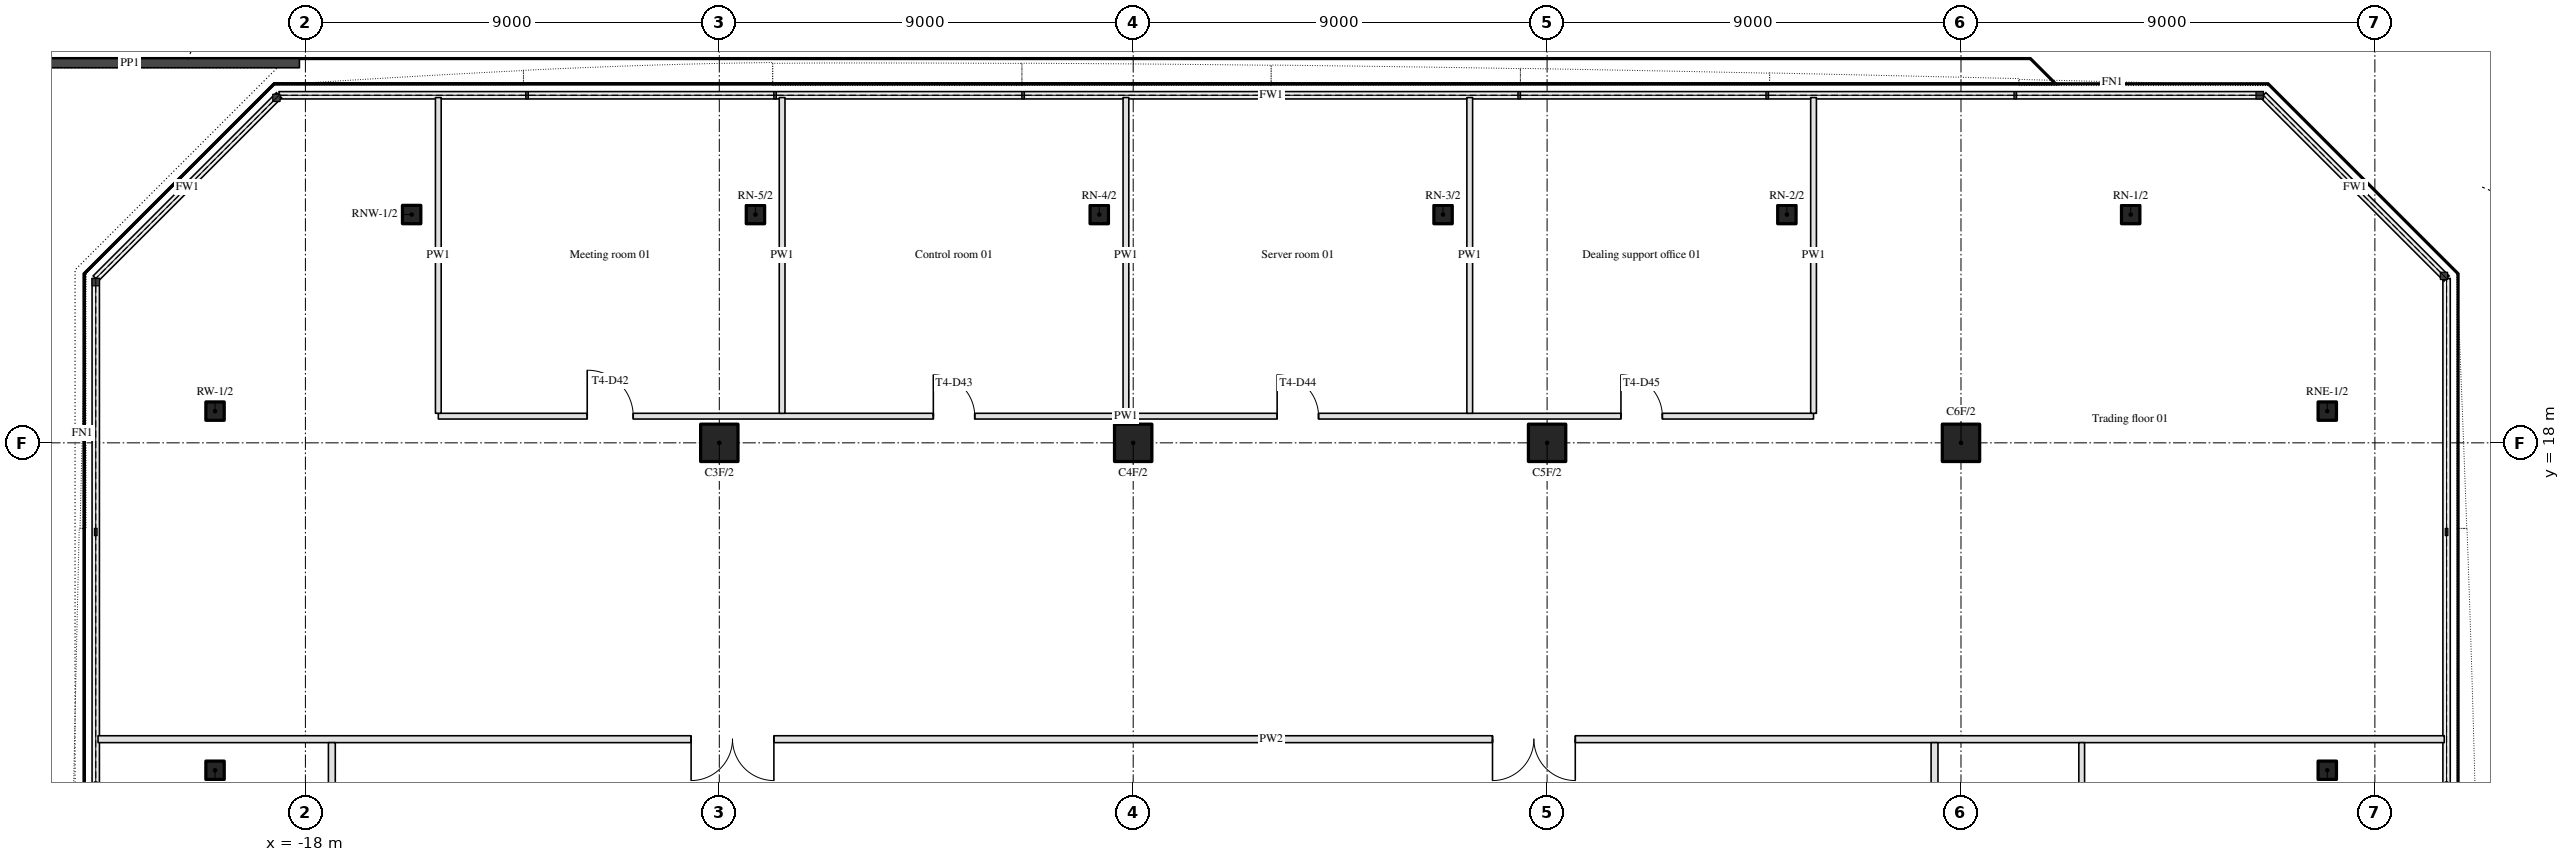
"""IFC4 building model, lengths in metres.
Left out: names, types, materials, properties, quantities, classifications, styles, units other than length and angle.
Written with IfcOpenShell. Run it as: python <this file> out.ifc"""

import sys

from ifc_helpers import new_model, si_unit, direction, frame, frame_2d, origin, origin_2d, place, context, subcontext, project, spatial, rectangle, hollow_rectangle, hollow_circle, extrude, element, fill, save


model = new_model("IFC4")
c1 = context("Model", 3, precision=1e-05, world=origin(), true_north=direction((0.0, 1.0)))
c2 = subcontext(c1, "Body", "Model", "MODEL_VIEW")
j1 = project(units=[si_unit("LENGTHUNIT", "METRE"), si_unit("PLANEANGLEUNIT", "RADIAN")], contexts=[c1])
p1 = place(None, origin())
s1 = spatial("IfcSite", under=j1, at=p1, CompositionType="ELEMENT")
p2 = place(p1, origin())
s2 = spatial("IfcBuilding", under=s1, at=p2, CompositionType="ELEMENT")
p3 = place(p2, frame((0.0, 0.0, 62.1)))
s3 = spatial("IfcBuildingStorey", under=s2, at=p3, CompositionType="ELEMENT", Elevation=62.1)
for number, where, z_axis, x_axis in (
    (1, (-9.0, 18.0, 0.0), (0.0, 0.0, 1.0), (1.0, 0.0, 0.0)),
    (2, (0.0, 18.0, 0.0), (0.0, 0.0, 1.0), (1.0, 0.0, 0.0)),
    (3, (9.0, 18.0, 0.0), (0.0, 0.0, 1.0), (1.0, 0.0, 0.0)),
    (4, (18.0, 18.0, 0.0), (0.0, 0.0, 1.0), (1.0, 0.0, 0.0)),
):
    element("IfcColumn", number, at=place(p3, frame(where, z_axis=z_axis, x_axis=x_axis)), inside=s3, PredefinedType="COLUMN", context=c2, shape_type="SweptSolid", body=[
        extrude(hollow_circle(Radius=0.406, WallThickness=0.036, at=origin_2d()), origin(), (0.0, 0.0, 1.0), 3.9),
    ])
for number, where, z_axis, x_axis in (
    (5, (25.965, 10.879, 0.0), (0.0, 0.0, 1.0), (1.0, 0.0, 0.0)),
    (6, (25.965, 18.69, 0.0), (0.0, 0.0, 1.0), (1.0, 0.0, 0.0)),
    (7, (21.69, 22.965, 0.0), (0.0, 0.0, 1.0), (1.0, 0.0, 0.0)),
    (8, (14.214, 22.965, 0.0), (0.0, 0.0, 1.0), (1.0, 0.0, 0.0)),
    (9, (6.738, 22.965, 0.0), (0.0, 0.0, 1.0), (1.0, 0.0, 0.0)),
    (10, (-0.738, 22.965, 0.0), (0.0, 0.0, 1.0), (1.0, 0.0, 0.0)),
    (11, (-8.214, 22.965, 0.0), (0.0, 0.0, 1.0), (1.0, 0.0, 0.0)),
    (12, (-15.69, 22.965, 0.0), (0.0, 0.0, 1.0), (1.0, 0.0, 0.0)),
    (13, (-19.965, 18.69, 0.0), (0.0, 0.0, 1.0), (1.0, 0.0, 0.0)),
    (14, (-19.965, 10.879, 0.0), (0.0, 0.0, 1.0), (1.0, 0.0, 0.0)),
):
    element("IfcColumn", number, at=place(p3, frame(where, z_axis=z_axis, x_axis=x_axis)), inside=s3, PredefinedType="COLUMN", context=c2, shape_type="SweptSolid", body=[
        extrude(hollow_rectangle(XDim=0.4, YDim=0.4, WallThickness=0.025, InnerFilletRadius=0.038, OuterFilletRadius=0.062, at=origin_2d()), origin(), (0.0, 0.0, 1.0), 3.9),
    ])
p4 = place(p3, frame((-18.13, 26.257, 0.0), z_axis=(0.0, 0.0, 1.0), x_axis=(-1.0, 0.0, 0.0)))
e15 = element("IfcWall", 15, at=p4, inside=s3, PredefinedType="PARAPET", context=c2, shape_type="SweptSolid", body=[
    extrude(rectangle(XDim=7.379, YDim=0.2, at=frame_2d((3.689, 0.0))), origin(), (0.0, 0.0, 1.0), 1.0),
])
p5 = place(p3, frame((28.509, 11.555, 0.0), z_axis=(0.0, 0.0, 1.0), x_axis=(-1.0, 0.0, 0.0)))
e16 = element("IfcWall", 16, at=p5, inside=s3, PredefinedType="PARTITIONING", context=c2, shape_type="SweptSolid", body=[
    extrude(rectangle(XDim=51.018, YDim=0.15, at=frame_2d((25.509, 0.0))), origin(), (0.0, 0.0, 1.0), 2.96),
])
p6 = place(p5, frame((36.322, 0.0, 0.0)))
e17 = element("IfcOpeningElement", 17, at=p6, cuts=e16, PredefinedType="OPENING", context=c2, shape_type="SweptSolid", body=[
    extrude(rectangle(XDim=1.8, YDim=2.1, at=frame_2d((0.9, 1.05))), frame((0.0, 0.085, 0.0), z_axis=(0.0, -1.0, 0.0), x_axis=(1.0, 0.0, 0.0)), (0.0, 0.0, 1.0), 0.17),
])
p7 = place(p5, frame((18.896, 0.0, 0.0)))
e18 = element("IfcOpeningElement", 18, at=p7, cuts=e16, PredefinedType="OPENING", context=c2, shape_type="SweptSolid", body=[
    extrude(rectangle(XDim=1.8, YDim=2.1, at=frame_2d((0.9, 1.05))), frame((0.0, 0.085, 0.0), z_axis=(0.0, -1.0, 0.0), x_axis=(1.0, 0.0, 0.0)), (0.0, 0.0, 1.0), 0.17),
])
p8 = place(p3, frame((-15.11, 18.58, 0.0), z_axis=(0.0, 0.0, 1.0), x_axis=(1.0, 0.0, 0.0)))
e19 = element("IfcWall", 19, at=p8, inside=s3, PredefinedType="PARTITIONING", context=c2, shape_type="SweptSolid", body=[
    extrude(rectangle(XDim=29.904, YDim=0.125, at=frame_2d((14.952, 0.0))), origin(), (0.0, 0.0, 1.0), 2.96),
])
p9 = place(p8, frame((10.764, 0.0, 0.0)))
e20 = element("IfcOpeningElement", 20, at=p9, cuts=e19, PredefinedType="OPENING", context=c2, shape_type="SweptSolid", body=[
    extrude(rectangle(XDim=0.9, YDim=2.1, at=frame_2d((0.45, 1.05))), frame((0.0, 0.073, 0.0), z_axis=(0.0, -1.0, 0.0), x_axis=(1.0, 0.0, 0.0)), (0.0, 0.0, 1.0), 0.145),
])
p10 = place(p8, frame((3.238, 0.0, 0.0)))
e21 = element("IfcOpeningElement", 21, at=p10, cuts=e19, PredefinedType="OPENING", context=c2, shape_type="SweptSolid", body=[
    extrude(rectangle(XDim=1.0, YDim=2.1, at=frame_2d((0.5, 1.05))), frame((0.0, 0.073, 0.0), z_axis=(0.0, -1.0, 0.0), x_axis=(1.0, 0.0, 0.0)), (0.0, 0.0, 1.0), 0.145),
])
p11 = place(p8, frame((25.716, 0.0, 0.0)))
e22 = element("IfcOpeningElement", 22, at=p11, cuts=e19, PredefinedType="OPENING", context=c2, shape_type="SweptSolid", body=[
    extrude(rectangle(XDim=0.9, YDim=2.1, at=frame_2d((0.45, 1.05))), frame((0.0, 0.073, 0.0), z_axis=(0.0, -1.0, 0.0), x_axis=(1.0, 0.0, 0.0)), (0.0, 0.0, 1.0), 0.145),
])
p12 = place(p8, frame((18.24, 0.0, 0.0)))
e23 = element("IfcOpeningElement", 23, at=p12, cuts=e19, PredefinedType="OPENING", context=c2, shape_type="SweptSolid", body=[
    extrude(rectangle(XDim=0.9, YDim=2.1, at=frame_2d((0.45, 1.05))), frame((0.0, 0.073, 0.0), z_axis=(0.0, -1.0, 0.0), x_axis=(1.0, 0.0, 0.0)), (0.0, 0.0, 1.0), 0.145),
])
p13 = place(p3, frame((-17.425, -14.925, 0.0), z_axis=(0.0, 0.0, 1.0), x_axis=(0.0, 1.0, 0.0)))
e24 = element("IfcWall", 24, at=p13, inside=s3, PredefinedType="PARTITIONING", context=c2, shape_type="SweptSolid", body=[
    extrude(rectangle(XDim=26.405, YDim=0.15, at=frame_2d((13.203, 0.0))), origin(), (0.0, 0.0, 1.0), 2.96),
])
p14 = place(p13, frame((0.762, 0.0, 0.0)))
e25 = element("IfcOpeningElement", 25, at=p14, cuts=e24, PredefinedType="OPENING", context=c2, shape_type="SweptSolid", body=[
    extrude(rectangle(XDim=0.9, YDim=2.1, at=frame_2d((0.45, 1.05))), frame((0.0, 0.085, 0.0), z_axis=(0.0, -1.0, 0.0), x_axis=(1.0, 0.0, 0.0)), (0.0, 0.0, 1.0), 0.17),
])
p15 = place(p13, frame((6.357, 0.0, 0.0)))
e26 = element("IfcOpeningElement", 26, at=p15, cuts=e24, PredefinedType="OPENING", context=c2, shape_type="SweptSolid", body=[
    extrude(rectangle(XDim=1.0, YDim=2.1, at=frame_2d((0.5, 1.05))), frame((0.0, 0.085, 0.0), z_axis=(0.0, -1.0, 0.0), x_axis=(1.0, 0.0, 0.0)), (0.0, 0.0, 1.0), 0.17),
])
p16 = place(p13, frame((14.168, 0.0, 0.0)))
e27 = element("IfcOpeningElement", 27, at=p16, cuts=e24, PredefinedType="OPENING", context=c2, shape_type="SweptSolid", body=[
    extrude(rectangle(XDim=1.0, YDim=2.1, at=frame_2d((0.5, 1.05))), frame((0.0, 0.085, 0.0), z_axis=(0.0, -1.0, 0.0), x_axis=(1.0, 0.0, 0.0)), (0.0, 0.0, 1.0), 0.17),
])
p17 = place(p13, frame((21.052, 0.0, 0.0)))
e28 = element("IfcOpeningElement", 28, at=p17, cuts=e24, PredefinedType="OPENING", context=c2, shape_type="SweptSolid", body=[
    extrude(rectangle(XDim=1.0, YDim=2.1, at=frame_2d((0.5, 1.05))), frame((0.0, 0.085, 0.0), z_axis=(0.0, -1.0, 0.0), x_axis=(1.0, 0.0, 0.0)), (0.0, 0.0, 1.0), 0.17),
])
for number, where, z_axis, x_axis in (
    (29, (-15.11, 18.643, 0.0), (0.0, 0.0, 1.0), (0.0, 1.0, 0.0)),
    (30, (-7.634, 18.643, 0.0), (0.0, 0.0, 1.0), (0.0, 1.0, 0.0)),
    (31, (-0.158, 18.643, 0.0), (0.0, 0.0, 1.0), (0.0, 1.0, 0.0)),
    (32, (7.318, 18.643, 0.0), (0.0, 0.0, 1.0), (0.0, 1.0, 0.0)),
    (33, (14.794, 18.643, 0.0), (0.0, 0.0, 1.0), (0.0, 1.0, 0.0)),
):
    element("IfcWall", number, at=place(p3, frame(where, z_axis=z_axis, x_axis=x_axis)), inside=s3, PredefinedType="PARTITIONING", context=c2, shape_type="SweptSolid", body=[
        extrude(rectangle(XDim=6.866, YDim=0.125, at=frame_2d((3.433, 0.0))), origin(), (0.0, 0.0, 1.0), 2.96),
    ])
p18 = place(p3, frame((17.425, -14.925, 0.0), z_axis=(0.0, 0.0, 1.0), x_axis=(0.0, 1.0, 0.0)))
e34 = element("IfcWall", 34, at=p18, inside=s3, PredefinedType="PARTITIONING", context=c2, shape_type="SweptSolid", body=[
    extrude(rectangle(XDim=26.405, YDim=0.15, at=frame_2d((13.203, 0.0))), origin(), (0.0, 0.0, 1.0), 2.96),
])
p19 = place(p18, frame((0.312, 0.0, 0.0)))
e35 = element("IfcOpeningElement", 35, at=p19, cuts=e34, PredefinedType="OPENING", context=c2, shape_type="SweptSolid", body=[
    extrude(rectangle(XDim=1.8, YDim=2.1, at=frame_2d((0.9, 1.05))), frame((0.0, 0.085, 0.0), z_axis=(0.0, -1.0, 0.0), x_axis=(1.0, 0.0, 0.0)), (0.0, 0.0, 1.0), 0.17),
])
p20 = place(p18, frame((12.592, 0.0, 0.0)))
e36 = element("IfcOpeningElement", 36, at=p20, cuts=e34, PredefinedType="OPENING", context=c2, shape_type="SweptSolid", body=[
    extrude(rectangle(XDim=1.8, YDim=2.1, at=frame_2d((0.9, 1.05))), frame((0.0, 0.085, 0.0), z_axis=(0.0, -1.0, 0.0), x_axis=(1.0, 0.0, 0.0)), (0.0, 0.0, 1.0), 0.17),
])
p21 = place(p18, frame((21.551, 0.0, 0.0)))
e37 = element("IfcOpeningElement", 37, at=p21, cuts=e34, PredefinedType="OPENING", context=c2, shape_type="SweptSolid", body=[
    extrude(rectangle(XDim=1.8, YDim=2.1, at=frame_2d((0.9, 1.05))), frame((0.0, 0.085, 0.0), z_axis=(0.0, -1.0, 0.0), x_axis=(1.0, 0.0, 0.0)), (0.0, 0.0, 1.0), 0.17),
])
p22 = place(p3, frame((20.625, 3.71, 0.0), z_axis=(0.0, 0.0, 1.0), x_axis=(0.0, 1.0, 0.0)))
e38 = element("IfcWall", 38, at=p22, inside=s3, PredefinedType="PARTITIONING", context=c2, shape_type="SweptSolid", body=[
    extrude(rectangle(XDim=7.77, YDim=0.125, at=frame_2d((3.885, 0.0))), origin(), (0.0, 0.0, 1.0), 2.96),
])
p23 = place(p6, origin())
e39 = element("IfcDoor", 39, at=p23, inside=s3, OperationType="DOUBLE_DOOR_SINGLE_SWING", PredefinedType="DOOR", context=c2, shape_type="SweptSolid", body=[
    extrude(rectangle(XDim=1.8, YDim=2.1, at=frame_2d((0.9, 1.05))), frame((0.0, 0.025, 0.0), z_axis=(0.0, -1.0, 0.0), x_axis=(1.0, 0.0, 0.0)), (0.0, 0.0, 1.0), 0.05),
])
fill(e17, e39)
p24 = place(p7, origin())
e40 = element("IfcDoor", 40, at=p24, inside=s3, OperationType="DOUBLE_DOOR_SINGLE_SWING", PredefinedType="DOOR", context=c2, shape_type="SweptSolid", body=[
    extrude(rectangle(XDim=1.8, YDim=2.1, at=frame_2d((0.9, 1.05))), frame((0.0, 0.025, 0.0), z_axis=(0.0, -1.0, 0.0), x_axis=(1.0, 0.0, 0.0)), (0.0, 0.0, 1.0), 0.05),
])
fill(e18, e40)
p25 = place(p9, origin())
e41 = element("IfcDoor", 41, at=p25, inside=s3, OperationType="SINGLE_SWING_LEFT", PredefinedType="DOOR", context=c2, shape_type="SweptSolid", body=[
    extrude(rectangle(XDim=0.9, YDim=2.1, at=frame_2d((0.45, 1.05))), frame((0.0, 0.025, 0.0), z_axis=(0.0, -1.0, 0.0), x_axis=(1.0, 0.0, 0.0)), (0.0, 0.0, 1.0), 0.05),
])
fill(e20, e41)
p26 = place(p10, origin())
e42 = element("IfcDoor", 42, at=p26, inside=s3, OperationType="SINGLE_SWING_LEFT", PredefinedType="DOOR", context=c2, shape_type="SweptSolid", body=[
    extrude(rectangle(XDim=1.0, YDim=2.1, at=frame_2d((0.5, 1.05))), frame((0.0, 0.025, 0.0), z_axis=(0.0, -1.0, 0.0), x_axis=(1.0, 0.0, 0.0)), (0.0, 0.0, 1.0), 0.05),
])
fill(e21, e42)
p27 = place(p11, origin())
e43 = element("IfcDoor", 43, at=p27, inside=s3, OperationType="SINGLE_SWING_LEFT", PredefinedType="DOOR", context=c2, shape_type="SweptSolid", body=[
    extrude(rectangle(XDim=0.9, YDim=2.1, at=frame_2d((0.45, 1.05))), frame((0.0, 0.025, 0.0), z_axis=(0.0, -1.0, 0.0), x_axis=(1.0, 0.0, 0.0)), (0.0, 0.0, 1.0), 0.05),
])
fill(e22, e43)
p28 = place(p12, origin())
e44 = element("IfcDoor", 44, at=p28, inside=s3, OperationType="SINGLE_SWING_LEFT", PredefinedType="DOOR", context=c2, shape_type="SweptSolid", body=[
    extrude(rectangle(XDim=0.9, YDim=2.1, at=frame_2d((0.45, 1.05))), frame((0.0, 0.025, 0.0), z_axis=(0.0, -1.0, 0.0), x_axis=(1.0, 0.0, 0.0)), (0.0, 0.0, 1.0), 0.05),
])
fill(e23, e44)
save(model, sys.argv[1])
